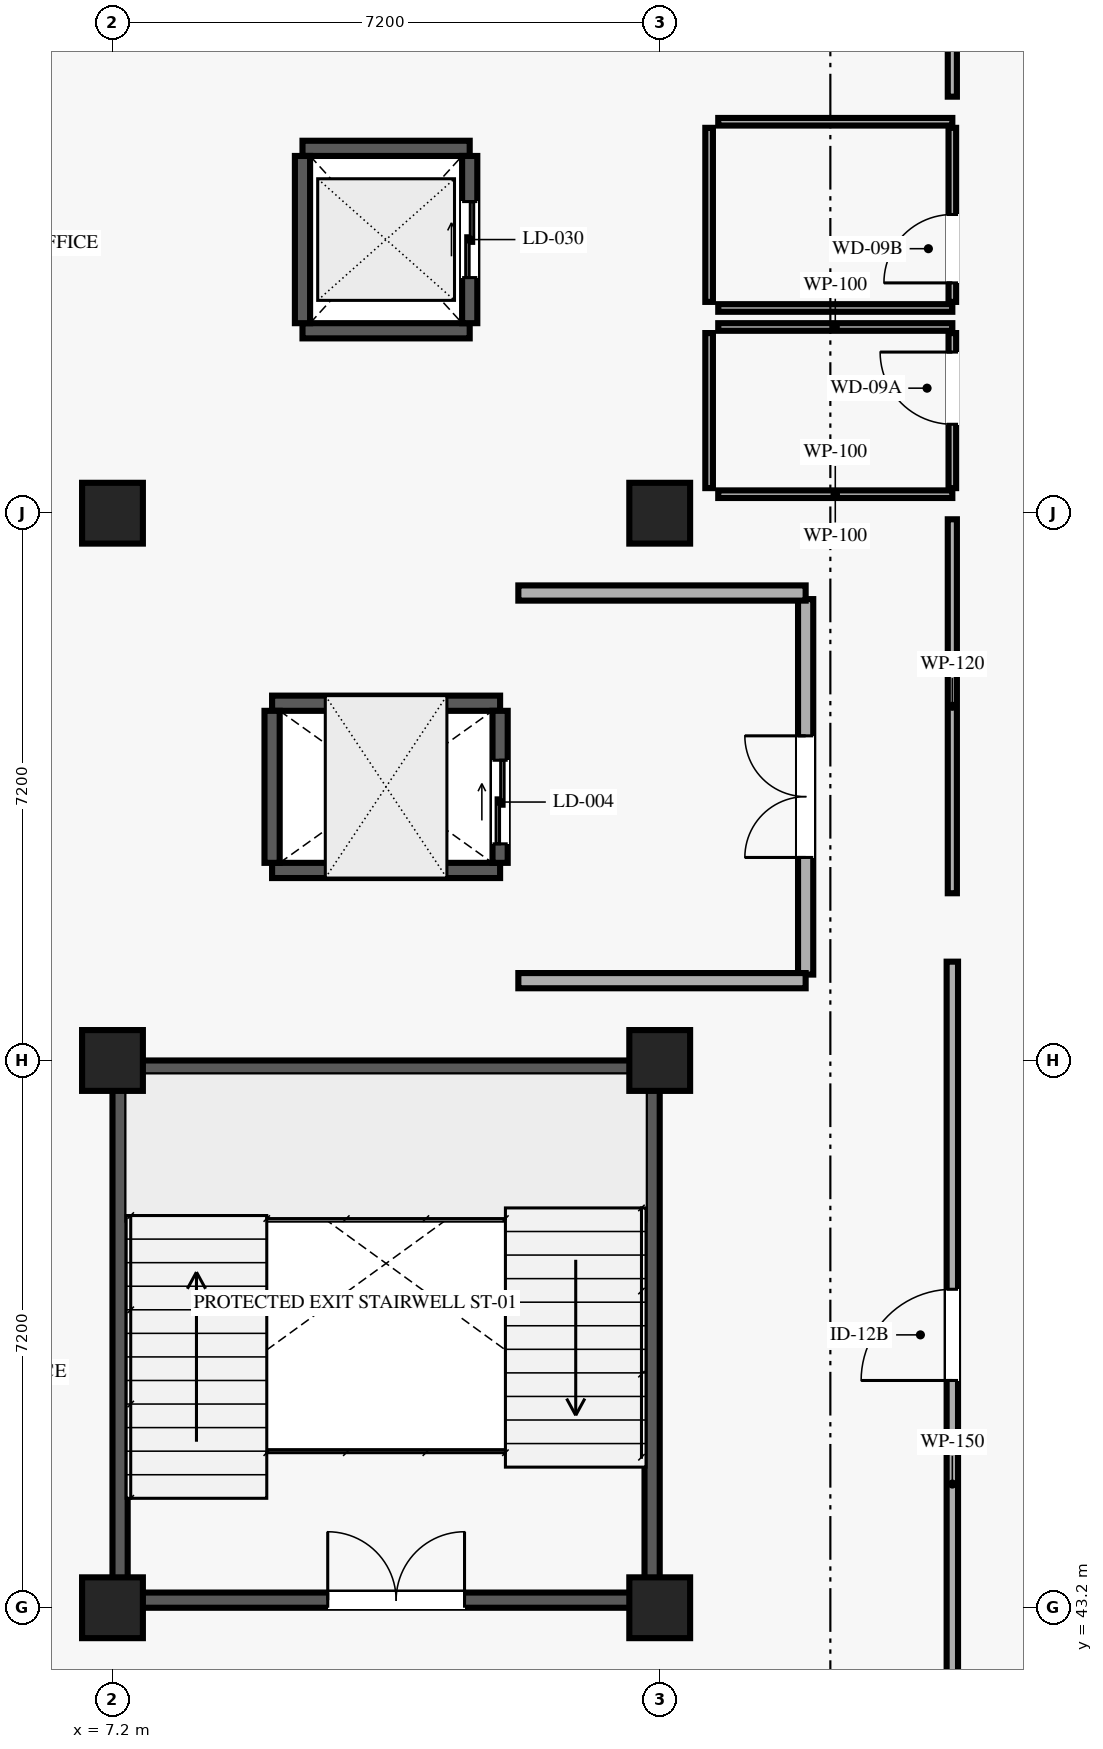
"""IFC4 building model, lengths in metres.
Left out: names, types, materials, properties, quantities, classifications, styles, units other than length and angle.
Written with IfcOpenShell. Run it as: python <this file> out.ifc"""

import sys

from ifc_helpers import new_model, si_unit, direction, frame, frame_2d, origin, origin_2d, place, context, subcontext, project, spatial, rectangle, extrude, element, fill, save


model = new_model("IFC4")
c1 = context("Model", 3, precision=1e-05, world=origin(), true_north=direction((0.0, 1.0)))
c2 = subcontext(c1, "Body", "Model", "MODEL_VIEW")
j1 = project(units=[si_unit("LENGTHUNIT", "METRE"), si_unit("PLANEANGLEUNIT", "RADIAN")], contexts=[c1])
p1 = place(None, origin())
s1 = spatial("IfcSite", under=j1, at=p1, CompositionType="ELEMENT")
p2 = place(p1, origin())
s2 = spatial("IfcBuilding", under=s1, at=p2, CompositionType="ELEMENT")
p3 = place(p2, frame((0.0, 0.0, 9.45)))
s3 = spatial("IfcBuildingStorey", under=s2, at=p3, CompositionType="ELEMENT", Elevation=9.45)
for number, where, z_axis, x_axis in (
    (1, (7.2, 43.2, 0.0), (0.0, 0.0, 1.0), (1.0, 0.0, 0.0)),
    (2, (7.2, 50.4, 0.0), (0.0, 0.0, 1.0), (1.0, 0.0, 0.0)),
    (3, (7.2, 57.6, 0.0), (0.0, 0.0, 1.0), (1.0, 0.0, 0.0)),
    (4, (14.4, 43.2, 0.0), (0.0, 0.0, 1.0), (1.0, 0.0, 0.0)),
    (5, (14.4, 50.4, 0.0), (0.0, 0.0, 1.0), (1.0, 0.0, 0.0)),
    (6, (14.4, 57.6, 0.0), (0.0, 0.0, 1.0), (1.0, 0.0, 0.0)),
):
    element("IfcColumn", number, at=place(p3, frame(where, z_axis=z_axis, x_axis=x_axis)), inside=s3, PredefinedType="COLUMN", context=c2, shape_type="SweptSolid", body=[
        extrude(rectangle(XDim=0.8, YDim=0.8, at=origin_2d()), origin(), (0.0, 0.0, 1.0), 4.05),
    ])
p4 = place(p3, frame((7.4, 43.3, 0.0), z_axis=(0.0, 0.0, 1.0), x_axis=(1.0, 0.0, 0.0)))
e7 = element("IfcWall", 7, at=p4, inside=s3, PredefinedType="SHEAR", context=c2, shape_type="SweptSolid", body=[
    extrude(rectangle(XDim=6.8, YDim=0.2, at=frame_2d((3.4, 0.0))), origin(), (0.0, 0.0, 1.0), 3.81),
])
p5 = place(p4, frame((2.632, 0.0, 0.0)))
e8 = element("IfcOpeningElement", 8, at=p5, cuts=e7, PredefinedType="OPENING", context=c2, shape_type="SweptSolid", body=[
    extrude(rectangle(XDim=1.8, YDim=2.2, at=frame_2d((0.9, 1.1))), frame((0.0, 0.11, 0.0), z_axis=(0.0, -1.0, 0.0), x_axis=(1.0, 0.0, 0.0)), (0.0, 0.0, 1.0), 0.22),
])
for number, where, z_axis, x_axis in (
    (9, (7.4, 50.3, 0.0), (0.0, 0.0, 1.0), (1.0, 0.0, 0.0)),
    (10, (7.3, 43.4, 0.0), (0.0, 0.0, 1.0), (0.0, 1.0, 0.0)),
    (11, (14.3, 43.4, 0.0), (0.0, 0.0, 1.0), (0.0, 1.0, 0.0)),
):
    element("IfcWall", number, at=place(p3, frame(where, z_axis=z_axis, x_axis=x_axis)), inside=s3, PredefinedType="SHEAR", context=c2, shape_type="SweptSolid", body=[
        extrude(rectangle(XDim=6.8, YDim=0.2, at=frame_2d((3.4, 0.0))), origin(), (0.0, 0.0, 1.0), 3.81),
    ])
for number, where, z_axis, x_axis in (
    (12, (9.3, 52.9, 0.0), (0.0, 0.0, 1.0), (1.0, 0.0, 0.0)),
    (13, (9.3, 55.1, 0.0), (0.0, 0.0, 1.0), (1.0, 0.0, 0.0)),
):
    element("IfcWall", number, at=place(p3, frame(where, z_axis=z_axis, x_axis=x_axis)), inside=s3, PredefinedType="SHEAR", context=c2, shape_type="SweptSolid", body=[
        extrude(rectangle(XDim=3.0, YDim=0.2, at=frame_2d((1.5, 0.0))), origin(), (0.0, 0.0, 1.0), 3.81),
    ])
p6 = place(p3, frame((9.3, 53.0, 0.0), z_axis=(0.0, 0.0, 1.0), x_axis=(0.0, 1.0, 0.0)))
e14 = element("IfcWall", 14, at=p6, inside=s3, PredefinedType="SHEAR", context=c2, shape_type="SweptSolid", body=[
    extrude(rectangle(XDim=2.0, YDim=0.2, at=frame_2d((1.0, 0.0))), origin(), (0.0, 0.0, 1.0), 3.81),
])
p7 = place(p3, frame((12.3, 53.0, 0.0), z_axis=(0.0, 0.0, 1.0), x_axis=(0.0, 1.0, 0.0)))
e15 = element("IfcWall", 15, at=p7, inside=s3, PredefinedType="SHEAR", context=c2, shape_type="SweptSolid", body=[
    extrude(rectangle(XDim=2.0, YDim=0.2, at=frame_2d((1.0, 0.0))), origin(), (0.0, 0.0, 1.0), 3.81),
])
p8 = place(p7, frame((0.25, 0.0, 0.0)))
e16 = element("IfcOpeningElement", 16, at=p8, cuts=e15, PredefinedType="OPENING", context=c2, shape_type="SweptSolid", body=[
    extrude(rectangle(XDim=1.1, YDim=2.15, at=frame_2d((0.55, 1.075))), frame((0.0, 0.11, 0.0), z_axis=(0.0, -1.0, 0.0), x_axis=(1.0, 0.0, 0.0)), (0.0, 0.0, 1.0), 0.22),
])
for number, where, z_axis, x_axis in (
    (17, (9.7, 60.0, 0.0), (0.0, 0.0, 1.0), (1.0, 0.0, 0.0)),
    (18, (9.7, 62.4, 0.0), (0.0, 0.0, 1.0), (1.0, 0.0, 0.0)),
    (19, (9.7, 60.1, 0.0), (0.0, 0.0, 1.0), (0.0, 1.0, 0.0)),
):
    element("IfcWall", number, at=place(p3, frame(where, z_axis=z_axis, x_axis=x_axis)), inside=s3, PredefinedType="SHEAR", context=c2, shape_type="SweptSolid", body=[
        extrude(rectangle(XDim=2.2, YDim=0.2, at=frame_2d((1.1, 0.0))), origin(), (0.0, 0.0, 1.0), 3.81),
    ])
p9 = place(p3, frame((11.9, 60.1, 0.0), z_axis=(0.0, 0.0, 1.0), x_axis=(0.0, 1.0, 0.0)))
e20 = element("IfcWall", 20, at=p9, inside=s3, PredefinedType="SHEAR", context=c2, shape_type="SweptSolid", body=[
    extrude(rectangle(XDim=2.2, YDim=0.2, at=frame_2d((1.1, 0.0))), origin(), (0.0, 0.0, 1.0), 3.81),
])
p10 = place(p9, frame((0.6, 0.0, 0.0)))
e21 = element("IfcOpeningElement", 21, at=p10, cuts=e20, PredefinedType="OPENING", context=c2, shape_type="SweptSolid", body=[
    extrude(rectangle(XDim=1.0, YDim=2.1, at=frame_2d((0.5, 1.05))), frame((0.0, 0.11, 0.0), z_axis=(0.0, -1.0, 0.0), x_axis=(1.0, 0.0, 0.0)), (0.0, 0.0, 1.0), 0.22),
])
p11 = place(p3, frame((16.32, 51.53, 0.0), z_axis=(0.0, 0.0, 1.0), x_axis=(0.0, 1.0, 0.0)))
e22 = element("IfcWall", 22, at=p11, inside=s3, PredefinedType="SOLIDWALL", context=c2, shape_type="SweptSolid", body=[
    extrude(rectangle(XDim=4.94, YDim=0.2, at=frame_2d((2.47, 0.0))), origin(), (0.0, 0.0, 1.0), 3.81),
])
p12 = place(p11, frame((1.541, 0.0, 0.0)))
e23 = element("IfcOpeningElement", 23, at=p12, cuts=e22, PredefinedType="OPENING", context=c2, shape_type="SweptSolid", body=[
    extrude(rectangle(XDim=1.6, YDim=2.2, at=frame_2d((0.8, 1.1))), frame((0.0, 0.11, 0.0), z_axis=(0.0, -1.0, 0.0), x_axis=(1.0, 0.0, 0.0)), (0.0, 0.0, 1.0), 0.22),
])
for number, where, z_axis, x_axis in (
    (24, (12.54, 51.45, 0.0), (0.0, 0.0, 1.0), (1.0, 0.0, 0.0)),
    (25, (12.54, 56.55, 0.0), (0.0, 0.0, 1.0), (1.0, 0.0, 0.0)),
):
    element("IfcWall", number, at=place(p3, frame(where, z_axis=z_axis, x_axis=x_axis)), inside=s3, PredefinedType="SOLIDWALL", context=c2, shape_type="SweptSolid", body=[
        extrude(rectangle(XDim=3.78, YDim=0.2, at=frame_2d((1.89, 0.0))), origin(), (0.0, 0.0, 1.0), 3.81),
    ])
p13 = place(p3, frame((18.25, 57.93, 0.0), z_axis=(0.0, 0.0, 1.0), x_axis=(0.0, 1.0, 0.0)))
e26 = element("IfcWall", 26, at=p13, inside=s3, PredefinedType="PARTITIONING", context=c2, shape_type="SweptSolid", body=[
    extrude(rectangle(XDim=2.04, YDim=0.1, at=frame_2d((1.02, 0.0))), origin(), (0.0, 0.0, 1.0), 3.81),
])
p14 = place(p13, frame((0.84, 0.0, 0.0)))
e27 = element("IfcOpeningElement", 27, at=p14, cuts=e26, PredefinedType="OPENING", context=c2, shape_type="SweptSolid", body=[
    extrude(rectangle(XDim=0.95, YDim=2.1, at=frame_2d((0.475, 1.05))), frame((0.0, 0.06, 0.0), z_axis=(0.0, -1.0, 0.0), x_axis=(1.0, 0.0, 0.0)), (0.0, 0.0, 1.0), 0.12),
])
p15 = place(p3, frame((15.17, 57.85, 0.0), z_axis=(0.0, 0.0, 1.0), x_axis=(1.0, 0.0, 0.0)))
e28 = element("IfcWall", 28, at=p15, inside=s3, PredefinedType="PARTITIONING", context=c2, shape_type="SweptSolid", body=[
    extrude(rectangle(XDim=3.08, YDim=0.1, at=frame_2d((1.54, 0.0))), origin(), (0.0, 0.0, 1.0), 3.2),
])
p16 = place(p3, frame((15.17, 60.05, 0.0), z_axis=(0.0, 0.0, 1.0), x_axis=(1.0, 0.0, 0.0)))
e29 = element("IfcWall", 29, at=p16, inside=s3, PredefinedType="PARTITIONING", context=c2, shape_type="SweptSolid", body=[
    extrude(rectangle(XDim=3.08, YDim=0.1, at=frame_2d((1.54, 0.0))), origin(), (0.0, 0.0, 1.0), 3.81),
])
p17 = place(p3, frame((15.05, 57.93, 0.0), z_axis=(0.0, 0.0, 1.0), x_axis=(0.0, 1.0, 0.0)))
e30 = element("IfcWall", 30, at=p17, inside=s3, PredefinedType="PARTITIONING", context=c2, shape_type="SweptSolid", body=[
    extrude(rectangle(XDim=2.04, YDim=0.1, at=frame_2d((1.02, 0.0))), origin(), (0.0, 0.0, 1.0), 3.81),
])
p18 = place(p3, frame((18.25, 60.38, 0.0), z_axis=(0.0, 0.0, 1.0), x_axis=(0.0, 1.0, 0.0)))
e31 = element("IfcWall", 31, at=p18, inside=s3, PredefinedType="PARTITIONING", context=c2, shape_type="SweptSolid", body=[
    extrude(rectangle(XDim=2.29, YDim=0.1, at=frame_2d((1.145, 0.0))), origin(), (0.0, 0.0, 1.0), 3.81),
])
p19 = place(p18, frame((0.25, 0.0, 0.0)))
e32 = element("IfcOpeningElement", 32, at=p19, cuts=e31, PredefinedType="OPENING", context=c2, shape_type="SweptSolid", body=[
    extrude(rectangle(XDim=0.9, YDim=2.1, at=frame_2d((0.45, 1.05))), frame((0.0, 0.06, 0.0), z_axis=(0.0, -1.0, 0.0), x_axis=(1.0, 0.0, 0.0)), (0.0, 0.0, 1.0), 0.12),
])
for number, where, z_axis, x_axis in (
    (33, (15.17, 60.3, 0.0), (0.0, 0.0, 1.0), (1.0, 0.0, 0.0)),
    (34, (15.17, 62.75, 0.0), (0.0, 0.0, 1.0), (1.0, 0.0, 0.0)),
):
    element("IfcWall", number, at=place(p3, frame(where, z_axis=z_axis, x_axis=x_axis)), inside=s3, PredefinedType="PARTITIONING", context=c2, shape_type="SweptSolid", body=[
        extrude(rectangle(XDim=3.08, YDim=0.1, at=frame_2d((1.54, 0.0))), origin(), (0.0, 0.0, 1.0), 3.81),
    ])
p20 = place(p3, frame((15.05, 60.38, 0.0), z_axis=(0.0, 0.0, 1.0), x_axis=(0.0, 1.0, 0.0)))
e35 = element("IfcWall", 35, at=p20, inside=s3, PredefinedType="PARTITIONING", context=c2, shape_type="SweptSolid", body=[
    extrude(rectangle(XDim=2.29, YDim=0.1, at=frame_2d((1.145, 0.0))), origin(), (0.0, 0.0, 1.0), 3.81),
])
p21 = place(p3, frame((18.25, 36.55, 0.0), z_axis=(0.0, 0.0, 1.0), x_axis=(0.0, 1.0, 0.0)))
e36 = element("IfcWall", 36, at=p21, inside=s3, PredefinedType="PARTITIONING", context=c2, shape_type="SweptSolid", body=[
    extrude(rectangle(XDim=15.15, YDim=0.15, at=frame_2d((7.575, 0.0))), origin(), (0.0, 0.0, 1.0), 3.81),
])
p22 = place(p21, frame((9.64, 0.0, 0.0)))
e37 = element("IfcOpeningElement", 37, at=p22, cuts=e36, PredefinedType="OPENING", context=c2, shape_type="SweptSolid", body=[
    extrude(rectangle(XDim=1.2, YDim=2.15, at=frame_2d((0.6, 1.075))), frame((0.0, 0.085, 0.0), z_axis=(0.0, -1.0, 0.0), x_axis=(1.0, 0.0, 0.0)), (0.0, 0.0, 1.0), 0.17),
])
p23 = place(p3, frame((18.25, 63.08, 0.0), z_axis=(0.0, 0.0, 1.0), x_axis=(0.0, 1.0, 0.0)))
e38 = element("IfcWall", 38, at=p23, inside=s3, PredefinedType="PARTITIONING", context=c2, shape_type="SweptSolid", body=[
    extrude(rectangle(XDim=8.62, YDim=0.12, at=frame_2d((4.31, 0.0))), origin(), (0.0, 0.0, 1.0), 3.81),
])
p24 = place(p23, frame((4.795, 0.0, 0.0)))
e39 = element("IfcOpeningElement", 39, at=p24, cuts=e38, PredefinedType="OPENING", context=c2, shape_type="SweptSolid", body=[
    extrude(rectangle(XDim=1.05, YDim=2.15, at=frame_2d((0.525, 1.075))), frame((0.0, 0.07, 0.0), z_axis=(0.0, -1.0, 0.0), x_axis=(1.0, 0.0, 0.0)), (0.0, 0.0, 1.0), 0.14),
])
p25 = place(p3, frame((18.25, 52.6, 0.0), z_axis=(0.0, 0.0, 1.0), x_axis=(0.0, 1.0, 0.0)))
e40 = element("IfcWall", 40, at=p25, inside=s3, PredefinedType="PARTITIONING", context=c2, shape_type="SweptSolid", body=[
    extrude(rectangle(XDim=4.92, YDim=0.12, at=frame_2d((2.46, 0.0))), origin(), (0.0, 0.0, 1.0), 3.81),
])
p26 = place(p5, origin())
e41 = element("IfcDoor", 41, at=p26, inside=s3, OperationType="DOUBLE_DOOR_SINGLE_SWING", PredefinedType="DOOR", context=c2, shape_type="SweptSolid", body=[
    extrude(rectangle(XDim=1.8, YDim=2.2, at=frame_2d((0.9, 1.1))), frame((0.0, 0.025, 0.0), z_axis=(0.0, -1.0, 0.0), x_axis=(1.0, 0.0, 0.0)), (0.0, 0.0, 1.0), 0.05),
])
fill(e8, e41)
p27 = place(p8, origin())
e42 = element("IfcDoor", 42, at=p27, inside=s3, OperationType="DOUBLE_DOOR_SLIDING", PredefinedType="DOOR", context=c2, shape_type="SweptSolid", body=[
    extrude(rectangle(XDim=1.1, YDim=2.15, at=frame_2d((0.55, 1.075))), frame((0.0, 0.025, 0.0), z_axis=(0.0, -1.0, 0.0), x_axis=(1.0, 0.0, 0.0)), (0.0, 0.0, 1.0), 0.05),
])
fill(e16, e42)
p28 = place(p10, origin())
e43 = element("IfcDoor", 43, at=p28, inside=s3, OperationType="DOUBLE_DOOR_SLIDING", PredefinedType="DOOR", context=c2, shape_type="SweptSolid", body=[
    extrude(rectangle(XDim=1.0, YDim=2.1, at=frame_2d((0.5, 1.05))), frame((0.0, 0.025, 0.0), z_axis=(0.0, -1.0, 0.0), x_axis=(1.0, 0.0, 0.0)), (0.0, 0.0, 1.0), 0.05),
])
fill(e21, e43)
p29 = place(p12, origin())
e44 = element("IfcDoor", 44, at=p29, inside=s3, OperationType="DOUBLE_DOOR_SINGLE_SWING", PredefinedType="DOOR", context=c2, shape_type="SweptSolid", body=[
    extrude(rectangle(XDim=1.6, YDim=2.2, at=frame_2d((0.8, 1.1))), frame((0.0, 0.025, 0.0), z_axis=(0.0, -1.0, 0.0), x_axis=(1.0, 0.0, 0.0)), (0.0, 0.0, 1.0), 0.05),
])
fill(e23, e44)
p30 = place(p14, origin())
e45 = element("IfcDoor", 45, at=p30, inside=s3, OperationType="SINGLE_SWING_RIGHT", PredefinedType="DOOR", context=c2, shape_type="SweptSolid", body=[
    extrude(rectangle(XDim=0.95, YDim=2.1, at=frame_2d((0.475, 1.05))), frame((0.0, 0.025, 0.0), z_axis=(0.0, -1.0, 0.0), x_axis=(1.0, 0.0, 0.0)), (0.0, 0.0, 1.0), 0.05),
])
fill(e27, e45)
p31 = place(p19, origin())
e46 = element("IfcDoor", 46, at=p31, inside=s3, OperationType="SINGLE_SWING_LEFT", PredefinedType="DOOR", context=c2, shape_type="SweptSolid", body=[
    extrude(rectangle(XDim=0.9, YDim=2.1, at=frame_2d((0.45, 1.05))), frame((0.0, 0.025, 0.0), z_axis=(0.0, -1.0, 0.0), x_axis=(1.0, 0.0, 0.0)), (0.0, 0.0, 1.0), 0.05),
])
fill(e32, e46)
p32 = place(p22, origin())
e47 = element("IfcDoor", 47, at=p32, inside=s3, OperationType="SINGLE_SWING_LEFT", PredefinedType="DOOR", context=c2, shape_type="SweptSolid", body=[
    extrude(rectangle(XDim=1.2, YDim=2.15, at=frame_2d((0.6, 1.075))), frame((0.0, 0.025, 0.0), z_axis=(0.0, -1.0, 0.0), x_axis=(1.0, 0.0, 0.0)), (0.0, 0.0, 1.0), 0.05),
])
fill(e37, e47)
save(model, sys.argv[1])
